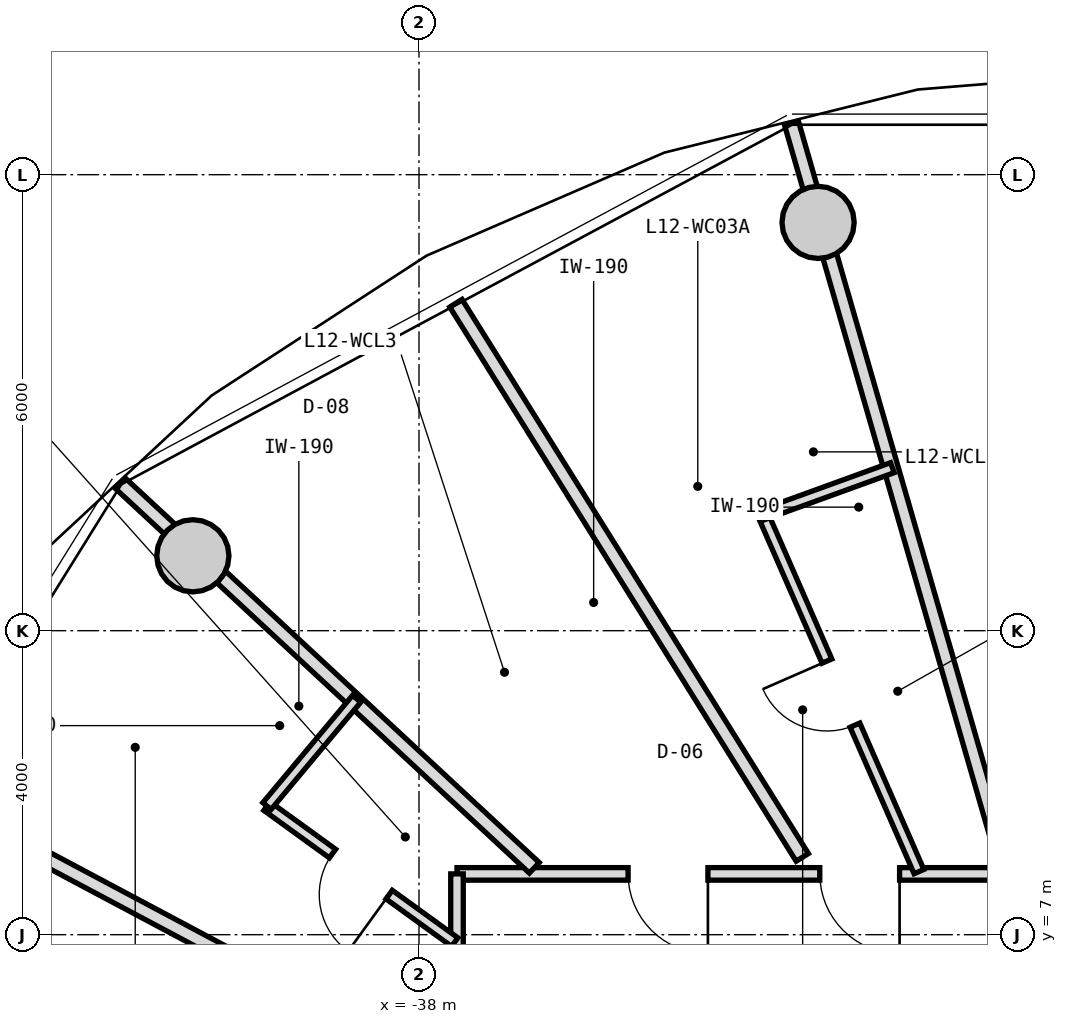
"""IFC4 building model, lengths in metres.
Left out: names, types, materials, properties, quantities, classifications, styles, units other than length and angle.
Written with IfcOpenShell. Run it as: python <this file> out.ifc"""

import sys

from ifc_helpers import new_model, si_unit, direction, frame, frame_2d, origin, origin_2d, place, context, subcontext, project, spatial, rectangle, circle, extrude, source, transform, mapped, element, fill, save


model = new_model("IFC4")
c1 = context("Model", 3, precision=1e-05, world=origin(), true_north=direction((0.0, 1.0)))
c2 = subcontext(c1, "Body", "Model", "MODEL_VIEW")
j1 = project(units=[si_unit("LENGTHUNIT", "METRE"), si_unit("PLANEANGLEUNIT", "RADIAN")], contexts=[c1])
p1 = place(None, origin())
s1 = spatial("IfcSite", under=j1, at=p1, CompositionType="ELEMENT")
p2 = place(p1, origin())
s2 = spatial("IfcBuilding", under=s1, at=p2, CompositionType="ELEMENT")
p3 = place(p2, frame((0.0, 0.0, 42.95)))
s3 = spatial("IfcBuildingStorey", under=s2, at=p3, CompositionType="ELEMENT", Elevation=42.95)
m1 = source(origin(), c2, "Body", "SweptSolid", [
    extrude(circle(Radius=0.475, at=origin_2d()), origin(), (0.0, 0.0, 1.0), 3.05),
])
for number, where, z_axis, x_axis in (
    (1, (-32.749, 16.373, 0.0), (0.0, 0.0, 1.0), (1.0, 0.0, 0.0)),
    (2, (-40.975, 11.985, 0.0), (0.0, 0.0, 1.0), (1.0, 0.0, 0.0)),
):
    element("IfcColumn", number, at=place(p3, frame(where, z_axis=z_axis, x_axis=x_axis)), inside=s3, PredefinedType="COLUMN", context=c2, shape_type="MappedRepresentation", body=[
        mapped(m1, transform((0.0, 0.0, 0.0), x_axis=(1.0, 0.0, 0.0), y_axis=(0.0, 1.0, 0.0), z_axis=(0.0, 0.0, 1.0), scale=1.0)),
    ])
m2 = source(origin(), c2, "Body", "SweptSolid", [
    extrude(rectangle(XDim=19.0, YDim=0.165, at=frame_2d((9.5, 0.0))), origin(), (0.0, 0.0, 1.0), 2.775),
])
p4 = place(p3, frame((-37.5, 7.8, 0.0), z_axis=(0.0, 0.0, 1.0), x_axis=(1.0, 0.0, 0.0)))
e3 = element("IfcWall", 3, at=p4, inside=s3, PredefinedType="PARTITIONING", context=c2, shape_type="MappedRepresentation", body=[
    mapped(m2, transform((0.0, 0.0, 0.0), x_axis=(1.0, 0.0, 0.0), y_axis=(0.0, 1.0, 0.0), z_axis=(0.0, 0.0, 1.0), scale=1.0)),
])
p5 = place(p4, frame((4.773, 0.0, 0.0)))
e4 = element("IfcOpeningElement", 4, at=p5, cuts=e3, PredefinedType="OPENING", context=c2, shape_type="SweptSolid", body=[
    extrude(rectangle(XDim=1.05, YDim=2.15, at=frame_2d((0.525, 1.075))), frame((0.0, 0.093, 0.0), z_axis=(0.0, -1.0, 0.0), x_axis=(1.0, 0.0, 0.0)), (0.0, 0.0, 1.0), 0.185),
])
p6 = place(p4, frame((2.251, 0.0, 0.0)))
e5 = element("IfcOpeningElement", 5, at=p6, cuts=e3, PredefinedType="OPENING", context=c2, shape_type="SweptSolid", body=[
    extrude(rectangle(XDim=1.05, YDim=2.15, at=frame_2d((0.525, 1.075))), frame((0.0, 0.093, 0.0), z_axis=(0.0, -1.0, 0.0), x_axis=(1.0, 0.0, 0.0)), (0.0, 0.0, 1.0), 0.185),
])
p7 = place(p4, frame((14.653, 0.0, 0.0)))
e6 = element("IfcOpeningElement", 6, at=p7, cuts=e3, PredefinedType="OPENING", context=c2, shape_type="SweptSolid", body=[
    extrude(rectangle(XDim=1.05, YDim=2.15, at=frame_2d((0.525, 1.075))), frame((0.0, 0.093, 0.0), z_axis=(0.0, -1.0, 0.0), x_axis=(1.0, 0.0, 0.0)), (0.0, 0.0, 1.0), 0.185),
])
p8 = place(p4, frame((12.5, 0.0, 0.0)))
e7 = element("IfcOpeningElement", 7, at=p8, cuts=e3, PredefinedType="OPENING", context=c2, shape_type="SweptSolid", body=[
    extrude(rectangle(XDim=1.05, YDim=2.15, at=frame_2d((0.525, 1.075))), frame((0.0, 0.093, 0.0), z_axis=(0.0, -1.0, 0.0), x_axis=(1.0, 0.0, 0.0)), (0.0, 0.0, 1.0), 0.185),
])
p9 = place(p4, frame((9.352, 0.0, 0.0)))
e8 = element("IfcOpeningElement", 8, at=p9, cuts=e3, PredefinedType="OPENING", context=c2, shape_type="SweptSolid", body=[
    extrude(rectangle(XDim=1.05, YDim=2.15, at=frame_2d((0.525, 1.075))), frame((0.0, 0.093, 0.0), z_axis=(0.0, -1.0, 0.0), x_axis=(1.0, 0.0, 0.0)), (0.0, 0.0, 1.0), 0.185),
])
p10 = place(p4, frame((7.806, 0.0, 0.0)))
e9 = element("IfcOpeningElement", 9, at=p10, cuts=e3, PredefinedType="OPENING", context=c2, shape_type="SweptSolid", body=[
    extrude(rectangle(XDim=1.05, YDim=2.15, at=frame_2d((0.525, 1.075))), frame((0.0, 0.093, 0.0), z_axis=(0.0, -1.0, 0.0), x_axis=(1.0, 0.0, 0.0)), (0.0, 0.0, 1.0), 0.185),
])
m3 = source(origin(), c2, "Body", "SweptSolid", [
    extrude(rectangle(XDim=15.6, YDim=0.165, at=frame_2d((7.8, 0.0))), origin(), (0.0, 0.0, 1.0), 2.775),
])
p11 = place(p3, frame((-37.5, -7.8, 0.0), z_axis=(0.0, 0.0, 1.0), x_axis=(0.0, 1.0, 0.0)))
e10 = element("IfcWall", 10, at=p11, inside=s3, PredefinedType="PARTITIONING", context=c2, shape_type="MappedRepresentation", body=[
    mapped(m3, transform((0.0, 0.0, 0.0), x_axis=(1.0, 0.0, 0.0), y_axis=(0.0, 1.0, 0.0), z_axis=(0.0, 0.0, 1.0), scale=1.0)),
])
p12 = place(p11, frame((13.293, 0.0, 0.0)))
e11 = element("IfcOpeningElement", 11, at=p12, cuts=e10, PredefinedType="OPENING", context=c2, shape_type="SweptSolid", body=[
    extrude(rectangle(XDim=1.05, YDim=2.15, at=frame_2d((0.525, 1.075))), frame((0.0, 0.093, 0.0), z_axis=(0.0, -1.0, 0.0), x_axis=(1.0, 0.0, 0.0)), (0.0, 0.0, 1.0), 0.185),
])
p13 = place(p11, frame((11.018, 0.0, 0.0)))
e12 = element("IfcOpeningElement", 12, at=p13, cuts=e10, PredefinedType="OPENING", context=c2, shape_type="SweptSolid", body=[
    extrude(rectangle(XDim=1.05, YDim=2.15, at=frame_2d((0.525, 1.075))), frame((0.0, 0.093, 0.0), z_axis=(0.0, -1.0, 0.0), x_axis=(1.0, 0.0, 0.0)), (0.0, 0.0, 1.0), 0.185),
])
p14 = place(p11, frame((7.812, 0.0, 0.0)))
e13 = element("IfcOpeningElement", 13, at=p14, cuts=e10, PredefinedType="OPENING", context=c2, shape_type="SweptSolid", body=[
    extrude(rectangle(XDim=1.05, YDim=2.15, at=frame_2d((0.525, 1.075))), frame((0.0, 0.093, 0.0), z_axis=(0.0, -1.0, 0.0), x_axis=(1.0, 0.0, 0.0)), (0.0, 0.0, 1.0), 0.185),
])
p15 = place(p11, frame((6.035, 0.0, 0.0)))
e14 = element("IfcOpeningElement", 14, at=p15, cuts=e10, PredefinedType="OPENING", context=c2, shape_type="SweptSolid", body=[
    extrude(rectangle(XDim=1.05, YDim=2.15, at=frame_2d((0.525, 1.075))), frame((0.0, 0.093, 0.0), z_axis=(0.0, -1.0, 0.0), x_axis=(1.0, 0.0, 0.0)), (0.0, 0.0, 1.0), 0.185),
])
p16 = place(p11, frame((3.489, 0.0, 0.0)))
e15 = element("IfcOpeningElement", 15, at=p16, cuts=e10, PredefinedType="OPENING", context=c2, shape_type="SweptSolid", body=[
    extrude(rectangle(XDim=1.05, YDim=2.15, at=frame_2d((0.525, 1.075))), frame((0.0, 0.093, 0.0), z_axis=(0.0, -1.0, 0.0), x_axis=(1.0, 0.0, 0.0)), (0.0, 0.0, 1.0), 0.185),
])
p17 = place(p11, frame((0.882, 0.0, 0.0)))
e16 = element("IfcOpeningElement", 16, at=p17, cuts=e10, PredefinedType="OPENING", context=c2, shape_type="SweptSolid", body=[
    extrude(rectangle(XDim=1.05, YDim=2.15, at=frame_2d((0.525, 1.075))), frame((0.0, 0.093, 0.0), z_axis=(0.0, -1.0, 0.0), x_axis=(1.0, 0.0, 0.0)), (0.0, 0.0, 1.0), 0.185),
])
m4 = source(origin(), c2, "Body", "SweptSolid", [
    extrude(rectangle(XDim=10.196, YDim=0.19, at=frame_2d((5.098, 0.0))), origin(), (0.0, 0.0, 1.0), 2.225),
])
p18 = place(p3, frame((-30.273, 7.88, 0.0), z_axis=(0.0, 0.0, 1.0), x_axis=(-0.277136420347, 0.960830580549, 0.0)))
e17 = element("IfcWall", 17, at=p18, inside=s3, PredefinedType="PARTITIONING", context=c2, shape_type="MappedRepresentation", body=[
    mapped(m4, transform((0.0, 0.0, 0.0), x_axis=(1.0, 0.0, 0.0), y_axis=(0.0, 1.0, 0.0), z_axis=(0.0, 0.0, 1.0), scale=1.0)),
])
m5 = source(origin(), c2, "Body", "SweptSolid", [
    extrude(rectangle(XDim=7.435, YDim=0.19, at=frame_2d((3.717, 0.0))), origin(), (0.0, 0.0, 1.0), 2.225),
])
p19 = place(p3, frame((-36.483, 7.88, 0.0), z_axis=(0.0, 0.0, 1.0), x_axis=(-0.732651956848, 0.680603489652, 0.0)))
e18 = element("IfcWall", 18, at=p19, inside=s3, PredefinedType="PARTITIONING", context=c2, shape_type="MappedRepresentation", body=[
    mapped(m5, transform((0.0, 0.0, 0.0), x_axis=(1.0, 0.0, 0.0), y_axis=(0.0, 1.0, 0.0), z_axis=(0.0, 0.0, 1.0), scale=1.0)),
])
m6 = source(origin(), c2, "Body", "SweptSolid", [
    extrude(rectangle(XDim=8.598, YDim=0.19, at=frame_2d((4.299, 0.0))), origin(), (0.0, 0.0, 1.0), 2.775),
])
p20 = place(p3, frame((-32.957, 8.017, 0.0), z_axis=(0.0, 0.0, 1.0), x_axis=(-0.530039776395, 0.847972779893, 0.0)))
e19 = element("IfcWall", 19, at=p20, inside=s3, PredefinedType="PARTITIONING", context=c2, shape_type="MappedRepresentation", body=[
    mapped(m6, transform((0.0, 0.0, 0.0), x_axis=(1.0, 0.0, 0.0), y_axis=(0.0, 1.0, 0.0), z_axis=(0.0, 0.0, 1.0), scale=1.0)),
])
m7 = source(origin(), c2, "Body", "SweptSolid", [
    extrude(rectangle(XDim=5.126, YDim=0.14, at=frame_2d((2.563, 0.0))), origin(), (0.0, 0.0, 1.0), 2.775),
])
p21 = place(p3, frame((-31.422, 7.83, 0.0), z_axis=(0.0, 0.0, 1.0), x_axis=(-0.400473994842, 0.916308124735, 0.0)))
e20 = element("IfcWall", 20, at=p21, inside=s3, PredefinedType="PARTITIONING", context=c2, shape_type="MappedRepresentation", body=[
    mapped(m7, transform((0.0, 0.0, 0.0), x_axis=(1.0, 0.0, 0.0), y_axis=(0.0, 1.0, 0.0), z_axis=(0.0, 0.0, 1.0), scale=1.0)),
])
p22 = place(p21, frame((2.103, 0.0, 0.0)))
e21 = element("IfcOpeningElement", 21, at=p22, cuts=e20, PredefinedType="OPENING", context=c2, shape_type="SweptSolid", body=[
    extrude(rectangle(XDim=0.92, YDim=2.1, at=frame_2d((0.46, 1.05))), frame((0.0, 0.08, 0.0), z_axis=(0.0, -1.0, 0.0), x_axis=(1.0, 0.0, 0.0)), (0.0, 0.0, 1.0), 0.16),
])
m8 = source(origin(), c2, "Body", "SweptSolid", [
    extrude(rectangle(XDim=1.811, YDim=0.14, at=frame_2d((0.906, 0.0))), origin(), (0.0, 0.0, 1.0), 2.775),
])
p23 = place(p3, frame((-33.475, 12.527, 0.0), z_axis=(0.0, 0.0, 1.0), x_axis=(0.940009682452, 0.341147764021, 0.0)))
e22 = element("IfcWall", 22, at=p23, inside=s3, PredefinedType="PARTITIONING", context=c2, shape_type="MappedRepresentation", body=[
    mapped(m8, transform((0.0, 0.0, 0.0), x_axis=(1.0, 0.0, 0.0), y_axis=(0.0, 1.0, 0.0), z_axis=(0.0, 0.0, 1.0), scale=1.0)),
])
m9 = source(origin(), c2, "Body", "SweptSolid", [
    extrude(rectangle(XDim=7.677, YDim=0.19, at=frame_2d((3.838, 0.0))), origin(), (0.0, 0.0, 1.0), 2.775),
])
p24 = place(p3, frame((-37.703, 5.231, 0.0), z_axis=(0.0, 0.0, 1.0), x_axis=(-0.882725057546, 0.469889851753, 0.0)))
e23 = element("IfcWall", 23, at=p24, inside=s3, PredefinedType="PARTITIONING", context=c2, shape_type="MappedRepresentation", body=[
    mapped(m9, transform((0.0, 0.0, 0.0), x_axis=(1.0, 0.0, 0.0), y_axis=(0.0, 1.0, 0.0), z_axis=(0.0, 0.0, 1.0), scale=1.0)),
])
m10 = source(origin(), c2, "Body", "SweptSolid", [
    extrude(rectangle(XDim=3.051, YDim=0.14, at=frame_2d((1.525, 0.0))), origin(), (0.0, 0.0, 1.0), 2.775),
])
p25 = place(p3, frame((-37.53, 6.903, 0.0), z_axis=(0.0, 0.0, 1.0), x_axis=(-0.809849031404, 0.586638343729, 0.0)))
e24 = element("IfcWall", 24, at=p25, inside=s3, PredefinedType="PARTITIONING", context=c2, shape_type="MappedRepresentation", body=[
    mapped(m10, transform((0.0, 0.0, 0.0), x_axis=(1.0, 0.0, 0.0), y_axis=(0.0, 1.0, 0.0), z_axis=(0.0, 0.0, 1.0), scale=1.0)),
])
p26 = place(p25, frame((1.065, 0.0, 0.0)))
e25 = element("IfcOpeningElement", 25, at=p26, cuts=e24, PredefinedType="OPENING", context=c2, shape_type="SweptSolid", body=[
    extrude(rectangle(XDim=0.92, YDim=2.1, at=frame_2d((0.46, 1.05))), frame((0.0, 0.08, 0.0), z_axis=(0.0, -1.0, 0.0), x_axis=(1.0, 0.0, 0.0)), (0.0, 0.0, 1.0), 0.16),
])
m11 = source(origin(), c2, "Body", "SweptSolid", [
    extrude(rectangle(XDim=1.84, YDim=0.14, at=frame_2d((0.92, 0.0))), origin(), (0.0, 0.0, 1.0), 2.415),
])
p27 = place(p3, frame((-40.0, 8.692, 0.0), z_axis=(0.0, 0.0, 1.0), x_axis=(0.641410397049, 0.767197955262, 0.0)))
e26 = element("IfcWall", 26, at=p27, inside=s3, PredefinedType="PARTITIONING", context=c2, shape_type="MappedRepresentation", body=[
    mapped(m11, transform((0.0, 0.0, 0.0), x_axis=(1.0, 0.0, 0.0), y_axis=(0.0, 1.0, 0.0), z_axis=(0.0, 0.0, 1.0), scale=1.0)),
])
m12 = source(origin(), c2, "Body", "SweptSolid", [
    extrude(rectangle(XDim=1.05, YDim=2.15, at=frame_2d((0.525, 1.075))), frame((0.0, 0.025, 0.0), z_axis=(0.0, -1.0, 0.0), x_axis=(1.0, 0.0, 0.0)), (0.0, 0.0, 1.0), 0.05),
])
p28 = place(p5, frame((1.05, 0.0, 0.0), z_axis=(0.0, 0.0, 1.0), x_axis=(-1.0, 0.0, 0.0)))
e27 = element("IfcDoor", 27, at=p28, inside=s3, OperationType="SINGLE_SWING_LEFT", PredefinedType="DOOR", context=c2, shape_type="MappedRepresentation", body=[
    mapped(m12, transform((0.0, 0.0, 0.0), x_axis=(1.0, 0.0, 0.0), y_axis=(0.0, 1.0, 0.0), z_axis=(0.0, 0.0, 1.0), scale=1.0)),
])
fill(e4, e27)
m13 = source(origin(), c2, "Body", "SweptSolid", [
    extrude(rectangle(XDim=0.92, YDim=2.1, at=frame_2d((0.46, 1.05))), frame((0.0, 0.025, 0.0), z_axis=(0.0, -1.0, 0.0), x_axis=(1.0, 0.0, 0.0)), (0.0, 0.0, 1.0), 0.05),
])
p29 = place(p22, origin())
e28 = element("IfcDoor", 28, at=p29, inside=s3, OperationType="SINGLE_SWING_RIGHT", PredefinedType="DOOR", context=c2, shape_type="MappedRepresentation", body=[
    mapped(m13, transform((0.0, 0.0, 0.0), x_axis=(1.0, 0.0, 0.0), y_axis=(0.0, 1.0, 0.0), z_axis=(0.0, 0.0, 1.0), scale=1.0)),
])
fill(e21, e28)
p30 = place(p6, frame((1.05, 0.0, 0.0), z_axis=(0.0, 0.0, 1.0), x_axis=(-1.0, 0.0, 0.0)))
e29 = element("IfcDoor", 29, at=p30, inside=s3, OperationType="SINGLE_SWING_LEFT", PredefinedType="DOOR", context=c2, shape_type="MappedRepresentation", body=[
    mapped(m12, transform((0.0, 0.0, 0.0), x_axis=(1.0, 0.0, 0.0), y_axis=(0.0, 1.0, 0.0), z_axis=(0.0, 0.0, 1.0), scale=1.0)),
])
fill(e5, e29)
p31 = place(p26, origin())
e30 = element("IfcDoor", 30, at=p31, inside=s3, OperationType="SINGLE_SWING_LEFT", PredefinedType="DOOR", context=c2, shape_type="MappedRepresentation", body=[
    mapped(m13, transform((0.0, 0.0, 0.0), x_axis=(1.0, 0.0, 0.0), y_axis=(0.0, 1.0, 0.0), z_axis=(0.0, 0.0, 1.0), scale=1.0)),
])
fill(e25, e30)
save(model, sys.argv[1])
